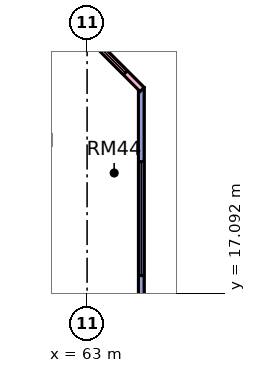
"""IFC4 building model, lengths in metres.
Left out: names, types, materials, properties, quantities, classifications, styles, units other than length and angle.
Written with IfcOpenShell. Run it as: python <this file> out.ifc"""

import sys

from ifc_helpers import new_model, si_unit, direction, frame, frame_2d, origin, place, context, subcontext, project, spatial, rectangle, extrude, element, fill, save


model = new_model("IFC4")
c1 = context("Model", 3, precision=1e-05, world=origin(), true_north=direction((0.0, 1.0)))
c2 = subcontext(c1, "Body", "Model", "MODEL_VIEW")
j1 = project(units=[si_unit("LENGTHUNIT", "METRE"), si_unit("PLANEANGLEUNIT", "RADIAN")], contexts=[c1])
p1 = place(None, origin())
s1 = spatial("IfcSite", under=j1, at=p1, CompositionType="ELEMENT")
p2 = place(p1, origin())
s2 = spatial("IfcBuilding", under=s1, at=p2, CompositionType="ELEMENT")
p3 = place(p2, frame((0.0, 0.0, 241.65)))
s3 = spatial("IfcBuildingStorey", under=s2, at=p3, CompositionType="ELEMENT", Elevation=241.65)
p4 = place(p3, frame((64.425, 12.075, 0.0), z_axis=(0.0, 0.0, 1.0), x_axis=(0.0, 1.0, 0.0)))
e1 = element("IfcWall", 1, at=p4, inside=s3, PredefinedType="SOLIDWALL", context=c2, shape_type="SweptSolid", body=[
    extrude(rectangle(XDim=10.425, YDim=0.15, at=frame_2d((5.212, 0.0))), origin(), (0.0, 0.0, 1.0), 3.35),
])
p5 = place(p4, frame((5.475, 0.0, 0.45)))
e2 = element("IfcOpeningElement", 2, at=p5, cuts=e1, PredefinedType="OPENING", context=c2, shape_type="SweptSolid", body=[
    extrude(rectangle(XDim=3.0, YDim=2.4, at=frame_2d((1.5, 1.2))), frame((0.0, 0.085, 0.0), z_axis=(0.0, -1.0, 0.0), x_axis=(1.0, 0.0, 0.0)), (0.0, 0.0, 1.0), 0.17),
])
p6 = place(p3, frame((64.447, 22.447, 0.0), z_axis=(0.0, 0.0, 1.0), x_axis=(-0.707106781187, 0.707106781187, 0.0)))
e3 = element("IfcWall", 3, at=p6, inside=s3, PredefinedType="SOLIDWALL", context=c2, shape_type="SweptSolid", body=[
    extrude(rectangle(XDim=4.243, YDim=0.15, at=frame_2d((2.121, 0.0))), origin(), (0.0, 0.0, 1.0), 3.35),
])
p7 = place(p6, frame((0.621, 0.0, 0.45)))
e4 = element("IfcOpeningElement", 4, at=p7, cuts=e3, PredefinedType="OPENING", context=c2, shape_type="SweptSolid", body=[
    extrude(rectangle(XDim=3.0, YDim=2.4, at=frame_2d((1.5, 1.2))), frame((0.0, 0.085, 0.0), z_axis=(0.0, -1.0, 0.0), x_axis=(1.0, 0.0, 0.0)), (0.0, 0.0, 1.0), 0.17),
])
p8 = place(p5, origin())
e5 = element("IfcWindow", 5, at=p8, inside=s3, PartitioningType="SINGLE_PANEL", PredefinedType="WINDOW", context=c2, shape_type="SweptSolid", body=[
    extrude(rectangle(XDim=3.0, YDim=2.4, at=frame_2d((1.5, 1.2))), frame((0.0, 0.03, 0.0), z_axis=(0.0, -1.0, 0.0), x_axis=(1.0, 0.0, 0.0)), (0.0, 0.0, 1.0), 0.06),
])
fill(e2, e5)
p9 = place(p7, origin())
e6 = element("IfcWindow", 6, at=p9, inside=s3, PartitioningType="SINGLE_PANEL", PredefinedType="WINDOW", context=c2, shape_type="SweptSolid", body=[
    extrude(rectangle(XDim=3.0, YDim=2.4, at=frame_2d((1.5, 1.2))), frame((0.0, 0.03, 0.0), z_axis=(0.0, -1.0, 0.0), x_axis=(1.0, 0.0, 0.0)), (0.0, 0.0, 1.0), 0.06),
])
fill(e4, e6)
save(model, sys.argv[1])
